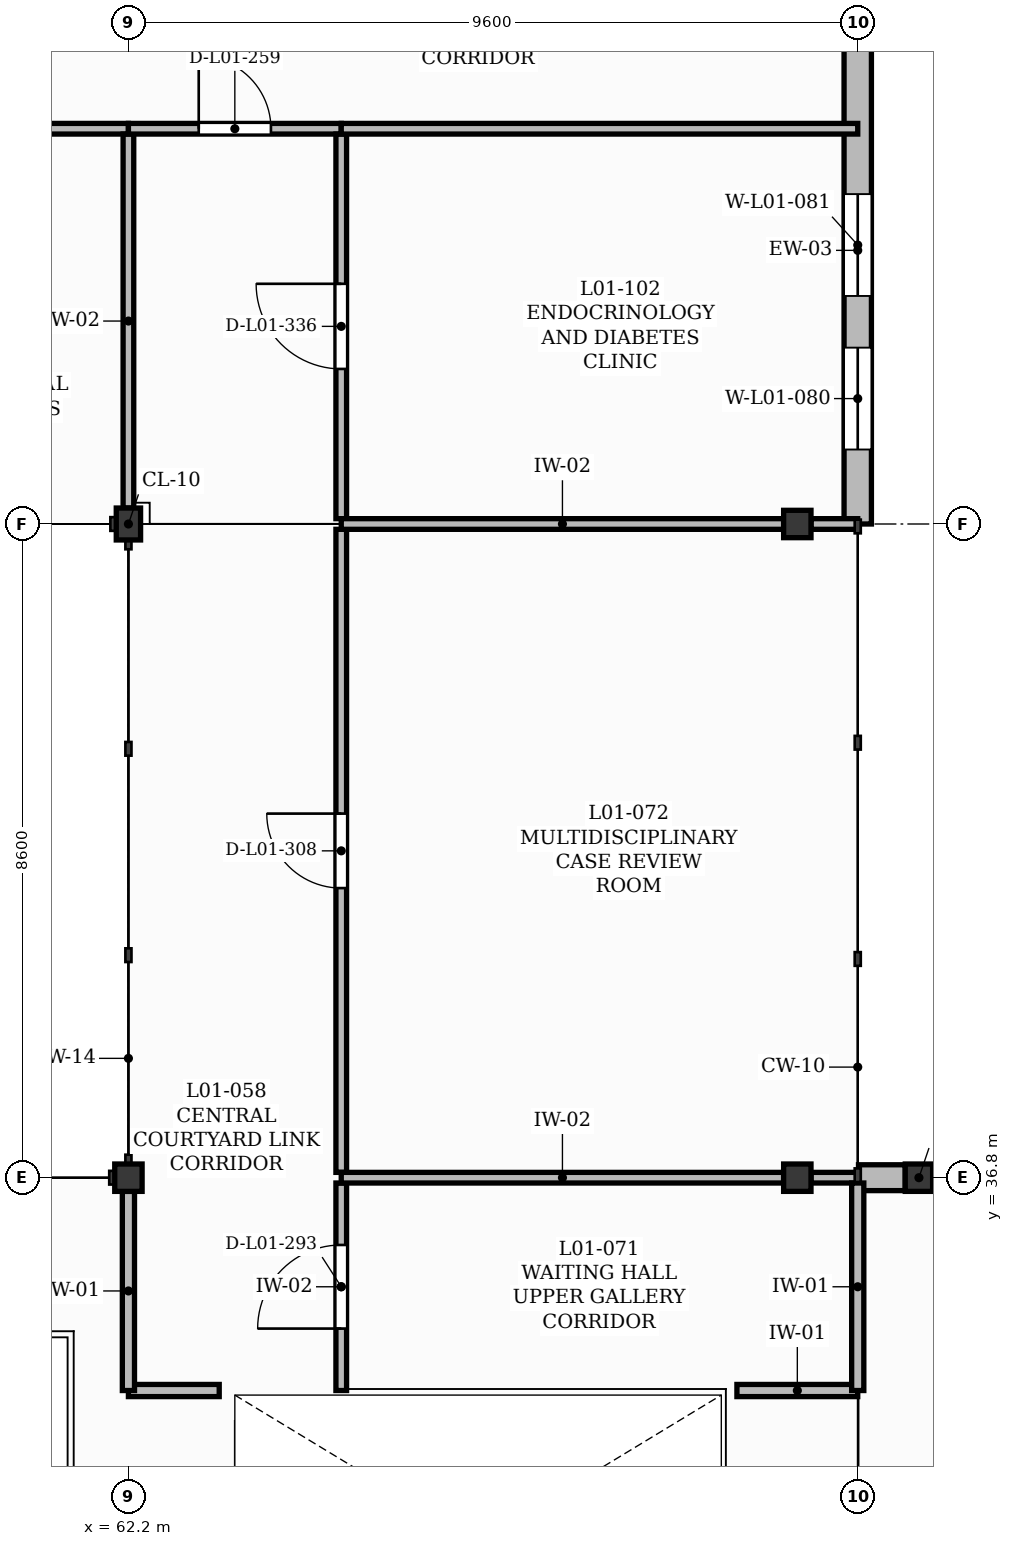
"""IFC4 building model, lengths in metres.
Left out: names, types, materials, properties, quantities, classifications, styles, units other than length and angle.
Written with IfcOpenShell. Run it as: python <this file> out.ifc"""

import sys

from ifc_helpers import new_model, si_unit, direction, frame, frame_2d, origin, origin_2d, place, context, subcontext, project, spatial, rectangle, extrude, element, fill, save


model = new_model("IFC4")
c1 = context("Model", 3, precision=1e-05, world=origin(), true_north=direction((0.0, 1.0)))
c2 = subcontext(c1, "Body", "Model", "MODEL_VIEW")
j1 = project(units=[si_unit("LENGTHUNIT", "METRE"), si_unit("PLANEANGLEUNIT", "RADIAN")], contexts=[c1])
p1 = place(None, origin())
s1 = spatial("IfcSite", under=j1, at=p1, CompositionType="ELEMENT")
p2 = place(p1, origin())
s2 = spatial("IfcBuilding", under=s1, at=p2, CompositionType="ELEMENT")
p3 = place(p2, frame((0.0, 0.0, 4.5)))
s3 = spatial("IfcBuildingStorey", under=s2, at=p3, CompositionType="ELEMENT", Elevation=4.5)
for number, where, z_axis, x_axis in (
    (1, (72.6, 36.8, 0.0), (0.0, 0.0, 1.0), (1.0, 0.0, 0.0)),
    (2, (62.2, 36.8, 0.0), (0.0, 0.0, 1.0), (1.0, 0.0, 0.0)),
):
    element("IfcColumn", number, at=place(p3, frame(where, z_axis=z_axis, x_axis=x_axis)), inside=s3, PredefinedType="COLUMN", context=c2, shape_type="SweptSolid", body=[
        extrude(rectangle(XDim=0.36, YDim=0.36, at=origin_2d()), origin(), (0.0, 0.0, 1.0), 4.3),
    ])
p4 = place(p3, frame((62.2, 45.4, 0.0), z_axis=(0.0, 0.0, 1.0), x_axis=(1.0, 0.0, 0.0)))
e3 = element("IfcColumn", 3, at=p4, inside=s3, PredefinedType="COLUMN", context=c2, shape_type="SweptSolid", body=[
    extrude(rectangle(XDim=0.32, YDim=0.42, at=origin_2d()), origin(), (0.0, 0.0, 1.0), 4.26),
])
p5 = place(p3, frame((71.0, 36.8, 0.0), z_axis=(0.0, 0.0, 1.0), x_axis=(1.0, 0.0, 0.0)))
e4 = element("IfcColumn", 4, at=p5, inside=s3, PredefinedType="COLUMN", context=c2, shape_type="SweptSolid", body=[
    extrude(rectangle(XDim=0.36, YDim=0.36, at=origin_2d()), origin(), (0.0, 0.0, 1.0), 4.3),
])
p6 = place(p3, frame((71.0, 45.4, 0.0), z_axis=(0.0, 0.0, 1.0), x_axis=(1.0, 0.0, 0.0)))
e5 = element("IfcColumn", 5, at=p6, inside=s3, PredefinedType="COLUMN", context=c2, shape_type="SweptSolid", body=[
    extrude(rectangle(XDim=0.36, YDim=0.36, at=origin_2d()), origin(), (0.0, 0.0, 1.0), 4.26),
])
p7 = place(p3, frame((71.795, 45.4, 0.0), z_axis=(0.0, 0.0, 1.0), x_axis=(0.0, 1.0, 0.0)))
e6 = element("IfcWall", 6, at=p7, inside=s3, PredefinedType="SOLIDWALL", context=c2, shape_type="SweptSolid", body=[
    extrude(rectangle(XDim=7.2, YDim=0.36, at=frame_2d((3.6, 0.0))), origin(), (0.0, 0.0, 1.0), 4.26),
])
p8 = place(p7, frame((0.98, 0.0, 1.0)))
e7 = element("IfcOpeningElement", 7, at=p8, cuts=e6, PredefinedType="OPENING", context=c2, shape_type="SweptSolid", body=[
    extrude(rectangle(XDim=1.34, YDim=1.95, at=frame_2d((0.67, 0.975))), frame((0.0, 0.19, 0.0), z_axis=(0.0, -1.0, 0.0), x_axis=(1.0, 0.0, 0.0)), (0.0, 0.0, 1.0), 0.38),
])
p9 = place(p7, frame((3.0, 0.0, 1.0)))
e8 = element("IfcOpeningElement", 8, at=p9, cuts=e6, PredefinedType="OPENING", context=c2, shape_type="SweptSolid", body=[
    extrude(rectangle(XDim=1.34, YDim=1.95, at=frame_2d((0.67, 0.975))), frame((0.0, 0.19, 0.0), z_axis=(0.0, -1.0, 0.0), x_axis=(1.0, 0.0, 0.0)), (0.0, 0.0, 1.0), 0.38),
])
p10 = place(p3, frame((71.805, 36.8, 0.0), z_axis=(0.0, 0.0, 1.0), x_axis=(1.0, 0.0, 0.0)))
e9 = element("IfcWall", 9, at=p10, inside=s3, PredefinedType="SOLIDWALL", context=c2, shape_type="SweptSolid", body=[
    extrude(rectangle(XDim=0.615, YDim=0.34, at=frame_2d((0.308, 0.0))), origin(), (0.0, 0.0, 1.0), 4.3),
])
p11 = place(p3, frame((58.478, 50.6, 0.0), z_axis=(0.0, 0.0, 1.0), x_axis=(1.0, 0.0, 0.0)))
e10 = element("IfcWall", 10, at=p11, inside=s3, PredefinedType="PARTITIONING", context=c2, shape_type="SweptSolid", body=[
    extrude(rectangle(XDim=3.722, YDim=0.14, at=frame_2d((1.861, 0.0))), origin(), (0.0, 0.0, 1.0), 4.18),
])
p12 = place(p11, frame((1.281, 0.0, 0.0)))
e11 = element("IfcOpeningElement", 11, at=p12, cuts=e10, PredefinedType="OPENING", context=c2, shape_type="SweptSolid", body=[
    extrude(rectangle(XDim=1.16, YDim=2.1, at=frame_2d((0.58, 1.05))), frame((0.0, 0.08, 0.0), z_axis=(0.0, -1.0, 0.0), x_axis=(1.0, 0.0, 0.0)), (0.0, 0.0, 1.0), 0.16),
])
p13 = place(p3, frame((62.2, 45.61, 0.0), z_axis=(0.0, 0.0, 1.0), x_axis=(0.0, 1.0, 0.0)))
e12 = element("IfcWall", 12, at=p13, inside=s3, PredefinedType="PARTITIONING", context=c2, shape_type="SweptSolid", body=[
    extrude(rectangle(XDim=4.92, YDim=0.14, at=frame_2d((2.46, 0.0))), origin(), (0.0, 0.0, 1.0), 3.74),
])
p14 = place(p3, frame((62.2, 50.6, 0.0), z_axis=(0.0, 0.0, 1.0), x_axis=(1.0, 0.0, 0.0)))
e13 = element("IfcWall", 13, at=p14, inside=s3, PredefinedType="PARTITIONING", context=c2, shape_type="SweptSolid", body=[
    extrude(rectangle(XDim=2.8, YDim=0.14, at=frame_2d((1.4, 0.0))), origin(), (0.0, 0.0, 1.0), 4.18),
])
p15 = place(p14, frame((0.925, 0.0, 0.0)))
e14 = element("IfcOpeningElement", 14, at=p15, cuts=e13, PredefinedType="OPENING", context=c2, shape_type="SweptSolid", body=[
    extrude(rectangle(XDim=0.95, YDim=2.1, at=frame_2d((0.475, 1.05))), frame((0.0, 0.08, 0.0), z_axis=(0.0, -1.0, 0.0), x_axis=(1.0, 0.0, 0.0)), (0.0, 0.0, 1.0), 0.16),
])
p16 = place(p3, frame((65.0, 34.0, 0.0), z_axis=(0.0, 0.0, 1.0), x_axis=(0.0, 1.0, 0.0)))
e15 = element("IfcWall", 15, at=p16, inside=s3, PredefinedType="PARTITIONING", context=c2, shape_type="SweptSolid", body=[
    extrude(rectangle(XDim=2.73, YDim=0.14, at=frame_2d((1.365, 0.0))), origin(), (0.0, 0.0, 1.0), 4.18),
])
p17 = place(p16, frame((0.815, 0.0, 0.0)))
e16 = element("IfcOpeningElement", 16, at=p17, cuts=e15, PredefinedType="OPENING", context=c2, shape_type="SweptSolid", body=[
    extrude(rectangle(XDim=1.1, YDim=2.1, at=frame_2d((0.55, 1.05))), frame((0.0, 0.08, 0.0), z_axis=(0.0, -1.0, 0.0), x_axis=(1.0, 0.0, 0.0)), (0.0, 0.0, 1.0), 0.16),
])
p18 = place(p3, frame((65.0, 36.87, 0.0), z_axis=(0.0, 0.0, 1.0), x_axis=(0.0, 1.0, 0.0)))
e17 = element("IfcWall", 17, at=p18, inside=s3, PredefinedType="PARTITIONING", context=c2, shape_type="SweptSolid", body=[
    extrude(rectangle(XDim=8.46, YDim=0.14, at=frame_2d((4.23, 0.0))), origin(), (0.0, 0.0, 1.0), 4.18),
])
p19 = place(p18, frame((3.74, 0.0, 0.0)))
e18 = element("IfcOpeningElement", 18, at=p19, cuts=e17, PredefinedType="OPENING", context=c2, shape_type="SweptSolid", body=[
    extrude(rectangle(XDim=0.98, YDim=2.15, at=frame_2d((0.49, 1.075))), frame((0.0, 0.08, 0.0), z_axis=(0.0, -1.0, 0.0), x_axis=(1.0, 0.0, 0.0)), (0.0, 0.0, 1.0), 0.16),
])
p20 = place(p3, frame((65.0, 36.8, 0.0), z_axis=(0.0, 0.0, 1.0), x_axis=(1.0, 0.0, 0.0)))
e19 = element("IfcWall", 19, at=p20, inside=s3, PredefinedType="PARTITIONING", context=c2, shape_type="SweptSolid", body=[
    extrude(rectangle(XDim=5.82, YDim=0.14, at=frame_2d((2.91, 0.0))), origin(), (0.0, 0.0, 1.0), 3.85),
])
p21 = place(p3, frame((71.18, 36.8, 0.0), z_axis=(0.0, 0.0, 1.0), x_axis=(1.0, 0.0, 0.0)))
e20 = element("IfcWall", 20, at=p21, inside=s3, PredefinedType="PARTITIONING", context=c2, shape_type="SweptSolid", body=[
    extrude(rectangle(XDim=0.615, YDim=0.14, at=frame_2d((0.308, 0.0))), origin(), (0.0, 0.0, 1.0), 4.18),
])
p22 = place(p3, frame((65.0, 45.47, 0.0), z_axis=(0.0, 0.0, 1.0), x_axis=(0.0, 1.0, 0.0)))
e21 = element("IfcWall", 21, at=p22, inside=s3, PredefinedType="PARTITIONING", context=c2, shape_type="SweptSolid", body=[
    extrude(rectangle(XDim=5.06, YDim=0.14, at=frame_2d((2.53, 0.0))), origin(), (0.0, 0.0, 1.0), 4.18),
])
p23 = place(p22, frame((1.97, 0.0, 0.0)))
e22 = element("IfcOpeningElement", 22, at=p23, cuts=e21, PredefinedType="OPENING", context=c2, shape_type="SweptSolid", body=[
    extrude(rectangle(XDim=1.12, YDim=2.15, at=frame_2d((0.56, 1.075))), frame((0.0, 0.08, 0.0), z_axis=(0.0, -1.0, 0.0), x_axis=(1.0, 0.0, 0.0)), (0.0, 0.0, 1.0), 0.16),
])
p24 = place(p3, frame((65.0, 45.4, 0.0), z_axis=(0.0, 0.0, 1.0), x_axis=(1.0, 0.0, 0.0)))
e23 = element("IfcWall", 23, at=p24, inside=s3, PredefinedType="PARTITIONING", context=c2, shape_type="SweptSolid", body=[
    extrude(rectangle(XDim=5.82, YDim=0.14, at=frame_2d((2.91, 0.0))), origin(), (0.0, 0.0, 1.0), 3.8),
])
p25 = place(p3, frame((71.18, 45.4, 0.0), z_axis=(0.0, 0.0, 1.0), x_axis=(1.0, 0.0, 0.0)))
e24 = element("IfcWall", 24, at=p25, inside=s3, PredefinedType="PARTITIONING", context=c2, shape_type="SweptSolid", body=[
    extrude(rectangle(XDim=0.615, YDim=0.14, at=frame_2d((0.308, 0.0))), origin(), (0.0, 0.0, 1.0), 4.18),
])
p26 = place(p3, frame((65.0, 50.6, 0.0), z_axis=(0.0, 0.0, 1.0), x_axis=(1.0, 0.0, 0.0)))
e25 = element("IfcWall", 25, at=p26, inside=s3, PredefinedType="PARTITIONING", context=c2, shape_type="SweptSolid", body=[
    extrude(rectangle(XDim=6.795, YDim=0.14, at=frame_2d((3.397, 0.0))), origin(), (0.0, 0.0, 1.0), 4.18),
])
p27 = place(p3, frame((62.2, 34.0, 0.0), z_axis=(0.0, 0.0, 1.0), x_axis=(1.0, 0.0, 0.0)))
e26 = element("IfcWall", 26, at=p27, inside=s3, PredefinedType="PARTITIONING", context=c2, shape_type="SweptSolid", body=[
    extrude(rectangle(XDim=1.195, YDim=0.16, at=frame_2d((0.597, 0.0))), origin(), (0.0, 0.0, 1.0), 4.18),
])
p28 = place(p3, frame((62.2, 34.0, 0.0), z_axis=(0.0, 0.0, 1.0), x_axis=(0.0, 1.0, 0.0)))
e27 = element("IfcWall", 27, at=p28, inside=s3, PredefinedType="PARTITIONING", context=c2, shape_type="SweptSolid", body=[
    extrude(rectangle(XDim=2.62, YDim=0.16, at=frame_2d((1.31, 0.0))), origin(), (0.0, 0.0, 1.0), 4.18),
])
p29 = place(p3, frame((70.206, 34.0, 0.0), z_axis=(0.0, 0.0, 1.0), x_axis=(1.0, 0.0, 0.0)))
e28 = element("IfcWall", 28, at=p29, inside=s3, PredefinedType="PARTITIONING", context=c2, shape_type="SweptSolid", body=[
    extrude(rectangle(XDim=1.589, YDim=0.16, at=frame_2d((0.795, 0.0))), origin(), (0.0, 0.0, 1.0), 4.18),
])
p30 = place(p3, frame((71.795, 34.0, 0.0), z_axis=(0.0, 0.0, 1.0), x_axis=(0.0, 1.0, 0.0)))
e29 = element("IfcWall", 29, at=p30, inside=s3, PredefinedType="PARTITIONING", context=c2, shape_type="SweptSolid", body=[
    extrude(rectangle(XDim=2.73, YDim=0.16, at=frame_2d((1.365, 0.0))), origin(), (0.0, 0.0, 1.0), 4.18),
])
p31 = place(p8, origin())
e30 = element("IfcWindow", 30, at=p31, inside=s3, PartitioningType="SINGLE_PANEL", PredefinedType="WINDOW", context=c2, shape_type="SweptSolid", body=[
    extrude(rectangle(XDim=1.34, YDim=1.95, at=frame_2d((0.67, 0.975))), frame((0.0, 0.03, 0.0), z_axis=(0.0, -1.0, 0.0), x_axis=(1.0, 0.0, 0.0)), (0.0, 0.0, 1.0), 0.06),
])
fill(e7, e30)
p32 = place(p9, origin())
e31 = element("IfcWindow", 31, at=p32, inside=s3, PartitioningType="SINGLE_PANEL", PredefinedType="WINDOW", context=c2, shape_type="SweptSolid", body=[
    extrude(rectangle(XDim=1.34, YDim=1.95, at=frame_2d((0.67, 0.975))), frame((0.0, 0.03, 0.0), z_axis=(0.0, -1.0, 0.0), x_axis=(1.0, 0.0, 0.0)), (0.0, 0.0, 1.0), 0.06),
])
fill(e8, e31)
p33 = place(p15, origin())
e32 = element("IfcDoor", 32, at=p33, inside=s3, OperationType="SINGLE_SWING_LEFT", PredefinedType="DOOR", context=c2, shape_type="SweptSolid", body=[
    extrude(rectangle(XDim=0.95, YDim=2.1, at=frame_2d((0.475, 1.05))), frame((0.0, 0.025, 0.0), z_axis=(0.0, -1.0, 0.0), x_axis=(1.0, 0.0, 0.0)), (0.0, 0.0, 1.0), 0.05),
])
fill(e14, e32)
p34 = place(p17, origin())
e33 = element("IfcDoor", 33, at=p34, inside=s3, OperationType="SINGLE_SWING_LEFT", PredefinedType="DOOR", context=c2, shape_type="SweptSolid", body=[
    extrude(rectangle(XDim=1.1, YDim=2.1, at=frame_2d((0.55, 1.05))), frame((0.0, 0.025, 0.0), z_axis=(0.0, -1.0, 0.0), x_axis=(1.0, 0.0, 0.0)), (0.0, 0.0, 1.0), 0.05),
])
fill(e16, e33)
p35 = place(p19, origin())
e34 = element("IfcDoor", 34, at=p35, inside=s3, OperationType="SINGLE_SWING_RIGHT", PredefinedType="DOOR", context=c2, shape_type="SweptSolid", body=[
    extrude(rectangle(XDim=0.98, YDim=2.15, at=frame_2d((0.49, 1.075))), frame((0.0, 0.025, 0.0), z_axis=(0.0, -1.0, 0.0), x_axis=(1.0, 0.0, 0.0)), (0.0, 0.0, 1.0), 0.05),
])
fill(e18, e34)
p36 = place(p23, origin())
e35 = element("IfcDoor", 35, at=p36, inside=s3, OperationType="SINGLE_SWING_RIGHT", PredefinedType="DOOR", context=c2, shape_type="SweptSolid", body=[
    extrude(rectangle(XDim=1.12, YDim=2.15, at=frame_2d((0.56, 1.075))), frame((0.0, 0.025, 0.0), z_axis=(0.0, -1.0, 0.0), x_axis=(1.0, 0.0, 0.0)), (0.0, 0.0, 1.0), 0.05),
])
fill(e22, e35)
save(model, sys.argv[1])
